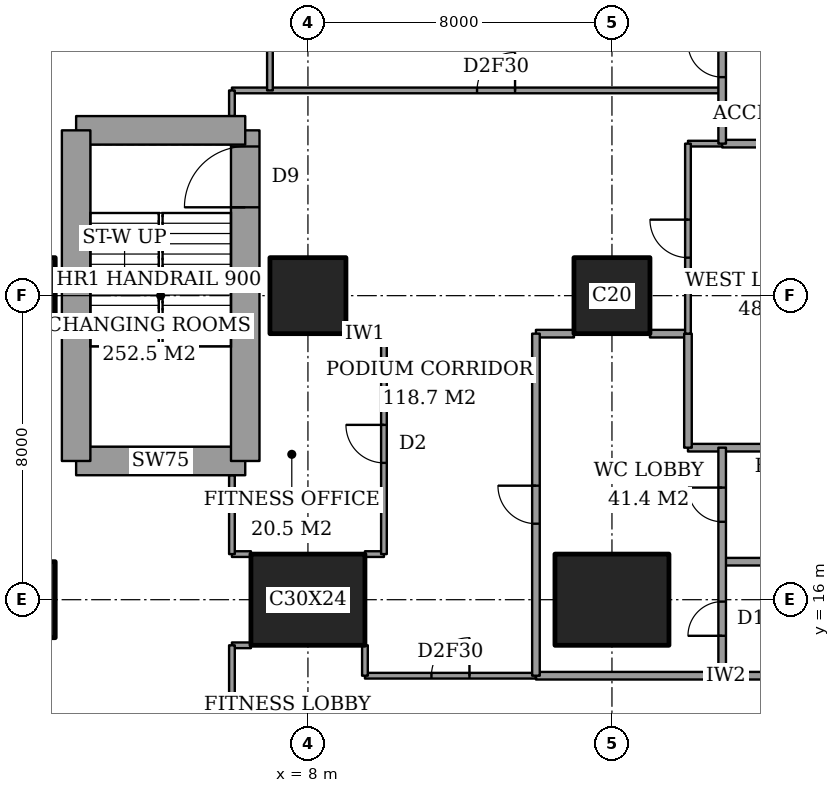
"""IFC4 building model, lengths in metres.
Left out: names, types, materials, properties, quantities, classifications, styles, units other than length and angle.
Written with IfcOpenShell. Run it as: python <this file> out.ifc"""

import sys

from ifc_helpers import new_model, si_unit, direction, frame, frame_2d, origin, origin_2d, place, context, subcontext, project, spatial, rectangle, extrude, element, fill, save


model = new_model("IFC4")
c1 = context("Model", 3, precision=1e-05, world=origin(), true_north=direction((0.0, 1.0)))
c2 = subcontext(c1, "Body", "Model", "MODEL_VIEW")
j1 = project(units=[si_unit("LENGTHUNIT", "METRE"), si_unit("PLANEANGLEUNIT", "RADIAN")], contexts=[c1])
p1 = place(None, origin())
s1 = spatial("IfcSite", under=j1, at=p1, CompositionType="ELEMENT")
p2 = place(p1, origin())
s2 = spatial("IfcBuilding", under=s1, at=p2, CompositionType="ELEMENT")
p3 = place(p2, frame((0.0, 0.0, 11.0)))
s3 = spatial("IfcBuildingStorey", under=s2, at=p3, CompositionType="ELEMENT", Elevation=11.0)
for number, where, z_axis, x_axis in (
    (1, (0.35, 16.0, 0.0), (0.0, 0.0, 1.0), (1.0, 0.0, 0.0)),
    (2, (0.35, 24.0, 0.0), (0.0, 0.0, 1.0), (1.0, 0.0, 0.0)),
):
    element("IfcColumn", number, at=place(p3, frame(where, z_axis=z_axis, x_axis=x_axis)), inside=s3, PredefinedType="COLUMN", context=c2, shape_type="SweptSolid", body=[
        extrude(rectangle(XDim=2.0, YDim=2.0, at=origin_2d()), origin(), (0.0, 0.0, 1.0), 5.0),
    ])
p4 = place(p3, frame((8.0, 16.0, 0.0), z_axis=(0.0, 0.0, 1.0), x_axis=(1.0, 0.0, 0.0)))
e3 = element("IfcColumn", 3, at=p4, inside=s3, PredefinedType="COLUMN", context=c2, shape_type="SweptSolid", body=[
    extrude(rectangle(XDim=3.0, YDim=2.4, at=origin_2d()), origin(), (0.0, 0.0, 1.0), 5.0),
])
p5 = place(p3, frame((8.0, 24.0, 0.0), z_axis=(0.0, 0.0, 1.0), x_axis=(1.0, 0.0, 0.0)))
e4 = element("IfcColumn", 4, at=p5, inside=s3, PredefinedType="COLUMN", context=c2, shape_type="SweptSolid", body=[
    extrude(rectangle(XDim=2.0, YDim=2.0, at=origin_2d()), origin(), (0.0, 0.0, 1.0), 5.0),
])
p6 = place(p3, frame((16.0, 16.0, 0.0), z_axis=(0.0, 0.0, 1.0), x_axis=(1.0, 0.0, 0.0)))
e5 = element("IfcColumn", 5, at=p6, inside=s3, PredefinedType="COLUMN", context=c2, shape_type="SweptSolid", body=[
    extrude(rectangle(XDim=3.0, YDim=2.4, at=origin_2d()), origin(), (0.0, 0.0, 1.0), 5.0),
])
p7 = place(p3, frame((16.0, 24.0, 0.0), z_axis=(0.0, 0.0, 1.0), x_axis=(1.0, 0.0, 0.0)))
e6 = element("IfcColumn", 6, at=p7, inside=s3, PredefinedType="COLUMN", context=c2, shape_type="SweptSolid", body=[
    extrude(rectangle(XDim=2.0, YDim=2.0, at=origin_2d()), origin(), (0.0, 0.0, 1.0), 5.0),
])
p8 = place(p3, frame((1.9, 19.65, 0.0), z_axis=(0.0, 0.0, 1.0), x_axis=(1.0, 0.0, 0.0)))
e7 = element("IfcWall", 7, at=p8, inside=s3, PredefinedType="SHEAR", context=c2, shape_type="SweptSolid", body=[
    extrude(rectangle(XDim=4.45, YDim=0.75, at=frame_2d((2.225, 0.0))), origin(), (0.0, 0.0, 1.0), 5.0),
])
p9 = place(p3, frame((6.35, 19.65, 0.0), z_axis=(0.0, 0.0, 1.0), x_axis=(0.0, 1.0, 0.0)))
e8 = element("IfcWall", 8, at=p9, inside=s3, PredefinedType="SHEAR", context=c2, shape_type="SweptSolid", body=[
    extrude(rectangle(XDim=8.7, YDim=0.75, at=frame_2d((4.35, 0.0))), origin(), (0.0, 0.0, 1.0), 5.0),
])
p10 = place(p9, frame((6.675, 0.0, 0.0)))
e9 = element("IfcOpeningElement", 9, at=p10, cuts=e8, PredefinedType="OPENING", context=c2, shape_type="SweptSolid", body=[
    extrude(rectangle(XDim=1.6, YDim=2.1, at=frame_2d((0.8, 1.05))), frame((0.0, 0.385, 0.0), z_axis=(0.0, -1.0, 0.0), x_axis=(1.0, 0.0, 0.0)), (0.0, 0.0, 1.0), 0.77),
])
p11 = place(p3, frame((6.35, 28.35, 0.0), z_axis=(0.0, 0.0, 1.0), x_axis=(-1.0, 0.0, 0.0)))
e10 = element("IfcWall", 10, at=p11, inside=s3, PredefinedType="SHEAR", context=c2, shape_type="SweptSolid", body=[
    extrude(rectangle(XDim=4.45, YDim=0.75, at=frame_2d((2.225, 0.0))), origin(), (0.0, 0.0, 1.0), 5.0),
])
p12 = place(p3, frame((1.9, 28.35, 0.0), z_axis=(0.0, 0.0, 1.0), x_axis=(0.0, -1.0, 0.0)))
e11 = element("IfcWall", 11, at=p12, inside=s3, PredefinedType="SHEAR", context=c2, shape_type="SweptSolid", body=[
    extrude(rectangle(XDim=8.7, YDim=0.75, at=frame_2d((4.35, 0.0))), origin(), (0.0, 0.0, 1.0), 5.0),
])
p13 = place(p3, frame((14.0, 14.0, 0.0), z_axis=(0.0, 0.0, 1.0), x_axis=(1.0, 0.0, 0.0)))
e12 = element("IfcWall", 12, at=p13, inside=s3, PredefinedType="PARTITIONING", context=c2, shape_type="SweptSolid", body=[
    extrude(rectangle(XDim=10.0, YDim=0.2, at=frame_2d((5.0, 0.0))), origin(), (0.0, 0.0, 1.0), 4.7),
])
p14 = place(p3, frame((9.5, 14.0, 0.0), z_axis=(0.0, 0.0, 1.0), x_axis=(1.0, 0.0, 0.0)))
e13 = element("IfcWall", 13, at=p14, inside=s3, PredefinedType="PARTITIONING", context=c2, shape_type="SweptSolid", body=[
    extrude(rectangle(XDim=4.5, YDim=0.15, at=frame_2d((2.25, 0.0))), origin(), (0.0, 0.0, 1.0), 4.7),
])
p15 = place(p14, frame((1.75, 0.0, 0.0)))
e14 = element("IfcOpeningElement", 14, at=p15, cuts=e13, PredefinedType="OPENING", context=c2, shape_type="SweptSolid", body=[
    extrude(rectangle(XDim=1.0, YDim=2.1, at=frame_2d((0.5, 1.05))), frame((0.0, 0.085, 0.0), z_axis=(0.0, -1.0, 0.0), x_axis=(1.0, 0.0, 0.0)), (0.0, 0.0, 1.0), 0.17),
])
p16 = place(p3, frame((6.0, 14.8, 0.0), z_axis=(0.0, 0.0, 1.0), x_axis=(1.0, 0.0, 0.0)))
e15 = element("IfcWall", 15, at=p16, inside=s3, PredefinedType="PARTITIONING", context=c2, shape_type="SweptSolid", body=[
    extrude(rectangle(XDim=0.5, YDim=0.15, at=frame_2d((0.25, 0.0))), origin(), (0.0, 0.0, 1.0), 4.7),
])
p17 = place(p3, frame((18.9, 17.0, 0.0), z_axis=(0.0, 0.0, 1.0), x_axis=(1.0, 0.0, 0.0)))
e16 = element("IfcWall", 16, at=p17, inside=s3, PredefinedType="PARTITIONING", context=c2, shape_type="SweptSolid", body=[
    extrude(rectangle(XDim=5.1, YDim=0.2, at=frame_2d((2.55, 0.0))), origin(), (0.0, 0.0, 1.0), 4.7),
])
for number, where, z_axis, x_axis in (
    (17, (6.0, 17.2, 0.0), (0.0, 0.0, 1.0), (1.0, 0.0, 0.0)),
    (18, (9.5, 17.2, 0.0), (0.0, 0.0, 1.0), (1.0, 0.0, 0.0)),
):
    element("IfcWall", number, at=place(p3, frame(where, z_axis=z_axis, x_axis=x_axis)), inside=s3, PredefinedType="PARTITIONING", context=c2, shape_type="SweptSolid", body=[
        extrude(rectangle(XDim=0.5, YDim=0.15, at=frame_2d((0.25, 0.0))), origin(), (0.0, 0.0, 1.0), 4.7),
    ])
p18 = place(p3, frame((18.0, 20.0, 0.0), z_axis=(0.0, 0.0, 1.0), x_axis=(1.0, 0.0, 0.0)))
e19 = element("IfcWall", 19, at=p18, inside=s3, PredefinedType="PARTITIONING", context=c2, shape_type="SweptSolid", body=[
    extrude(rectangle(XDim=6.0, YDim=0.2, at=frame_2d((3.0, 0.0))), origin(), (0.0, 0.0, 1.0), 4.7),
])
for number, where, z_axis, x_axis in (
    (20, (14.0, 23.0, 0.0), (0.0, 0.0, 1.0), (1.0, 0.0, 0.0)),
    (21, (17.0, 23.0, 0.0), (0.0, 0.0, 1.0), (1.0, 0.0, 0.0)),
):
    element("IfcWall", number, at=place(p3, frame(where, z_axis=z_axis, x_axis=x_axis)), inside=s3, PredefinedType="PARTITIONING", context=c2, shape_type="SweptSolid", body=[
        extrude(rectangle(XDim=1.0, YDim=0.2, at=frame_2d((0.5, 0.0))), origin(), (0.0, 0.0, 1.0), 4.7),
    ])
p19 = place(p3, frame((9.0, 23.0, 0.0), z_axis=(0.0, 0.0, 1.0), x_axis=(1.0, 0.0, 0.0)))
e22 = element("IfcWall", 22, at=p19, inside=s3, PredefinedType="PARTITIONING", context=c2, shape_type="SweptSolid", body=[
    extrude(rectangle(XDim=1.0, YDim=0.15, at=frame_2d((0.5, 0.0))), origin(), (0.0, 0.0, 1.0), 4.7),
])
p20 = place(p3, frame((18.9, 28.0, 0.0), z_axis=(0.0, 0.0, 1.0), x_axis=(1.0, 0.0, 0.0)))
e23 = element("IfcWall", 23, at=p20, inside=s3, PredefinedType="PARTITIONING", context=c2, shape_type="SweptSolid", body=[
    extrude(rectangle(XDim=5.1, YDim=0.2, at=frame_2d((2.55, 0.0))), origin(), (0.0, 0.0, 1.0), 4.7),
])
p21 = place(p3, frame((18.0, 28.0, 0.0), z_axis=(0.0, 0.0, 1.0), x_axis=(1.0, 0.0, 0.0)))
e24 = element("IfcWall", 24, at=p21, inside=s3, PredefinedType="PARTITIONING", context=c2, shape_type="SweptSolid", body=[
    extrude(rectangle(XDim=0.9, YDim=0.15, at=frame_2d((0.45, 0.0))), origin(), (0.0, 0.0, 1.0), 4.7),
])
p22 = place(p3, frame((6.0, 29.4, 0.0), z_axis=(0.0, 0.0, 1.0), x_axis=(1.0, 0.0, 0.0)))
e25 = element("IfcWall", 25, at=p22, inside=s3, PredefinedType="PARTITIONING", context=c2, shape_type="SweptSolid", body=[
    extrude(rectangle(XDim=12.9, YDim=0.15, at=frame_2d((6.45, 0.0))), origin(), (0.0, 0.0, 1.0), 4.7),
])
p23 = place(p22, frame((6.45, 0.0, 0.0)))
e26 = element("IfcOpeningElement", 26, at=p23, cuts=e25, PredefinedType="OPENING", context=c2, shape_type="SweptSolid", body=[
    extrude(rectangle(XDim=1.0, YDim=2.1, at=frame_2d((0.5, 1.05))), frame((0.0, 0.085, 0.0), z_axis=(0.0, -1.0, 0.0), x_axis=(1.0, 0.0, 0.0)), (0.0, 0.0, 1.0), 0.17),
])
p24 = place(p3, frame((6.0, 12.0, 0.0), z_axis=(0.0, 0.0, 1.0), x_axis=(0.0, 1.0, 0.0)))
e27 = element("IfcWall", 27, at=p24, inside=s3, PredefinedType="PARTITIONING", context=c2, shape_type="SweptSolid", body=[
    extrude(rectangle(XDim=2.8, YDim=0.15, at=frame_2d((1.4, 0.0))), origin(), (0.0, 0.0, 1.0), 4.7),
])
p25 = place(p3, frame((6.0, 17.2, 0.0), z_axis=(0.0, 0.0, 1.0), x_axis=(0.0, 1.0, 0.0)))
e28 = element("IfcWall", 28, at=p25, inside=s3, PredefinedType="PARTITIONING", context=c2, shape_type="SweptSolid", body=[
    extrude(rectangle(XDim=2.075, YDim=0.15, at=frame_2d((1.038, 0.0))), origin(), (0.0, 0.0, 1.0), 4.7),
])
p26 = place(p3, frame((6.0, 28.725, 0.0), z_axis=(0.0, 0.0, 1.0), x_axis=(0.0, 1.0, 0.0)))
e29 = element("IfcWall", 29, at=p26, inside=s3, PredefinedType="PARTITIONING", context=c2, shape_type="SweptSolid", body=[
    extrude(rectangle(XDim=0.675, YDim=0.15, at=frame_2d((0.337, 0.0))), origin(), (0.0, 0.0, 1.0), 4.7),
])
p27 = place(p3, frame((7.0, 29.4, 0.0), z_axis=(0.0, 0.0, 1.0), x_axis=(0.0, 1.0, 0.0)))
e30 = element("IfcWall", 30, at=p27, inside=s3, PredefinedType="PARTITIONING", context=c2, shape_type="SweptSolid", body=[
    extrude(rectangle(XDim=1.4, YDim=0.15, at=frame_2d((0.7, 0.0))), origin(), (0.0, 0.0, 1.0), 4.7),
])
p28 = place(p3, frame((9.5, 14.0, 0.0), z_axis=(0.0, 0.0, 1.0), x_axis=(0.0, 1.0, 0.0)))
e31 = element("IfcWall", 31, at=p28, inside=s3, PredefinedType="PARTITIONING", context=c2, shape_type="SweptSolid", body=[
    extrude(rectangle(XDim=0.8, YDim=0.15, at=frame_2d((0.4, 0.0))), origin(), (0.0, 0.0, 1.0), 4.7),
])
p29 = place(p3, frame((10.0, 17.2, 0.0), z_axis=(0.0, 0.0, 1.0), x_axis=(0.0, 1.0, 0.0)))
e32 = element("IfcWall", 32, at=p29, inside=s3, PredefinedType="PARTITIONING", context=c2, shape_type="SweptSolid", body=[
    extrude(rectangle(XDim=5.8, YDim=0.15, at=frame_2d((2.9, 0.0))), origin(), (0.0, 0.0, 1.0), 4.7),
])
p30 = place(p29, frame((2.4, 0.0, 0.0)))
e33 = element("IfcOpeningElement", 33, at=p30, cuts=e32, PredefinedType="OPENING", context=c2, shape_type="SweptSolid", body=[
    extrude(rectangle(XDim=1.0, YDim=2.1, at=frame_2d((0.5, 1.05))), frame((0.0, 0.085, 0.0), z_axis=(0.0, -1.0, 0.0), x_axis=(1.0, 0.0, 0.0)), (0.0, 0.0, 1.0), 0.17),
])
p31 = place(p3, frame((14.0, 14.0, 0.0), z_axis=(0.0, 0.0, 1.0), x_axis=(0.0, 1.0, 0.0)))
e34 = element("IfcWall", 34, at=p31, inside=s3, PredefinedType="PARTITIONING", context=c2, shape_type="SweptSolid", body=[
    extrude(rectangle(XDim=9.0, YDim=0.2, at=frame_2d((4.5, 0.0))), origin(), (0.0, 0.0, 1.0), 4.7),
])
p32 = place(p31, frame((4.0, 0.0, 0.0)))
e35 = element("IfcOpeningElement", 35, at=p32, cuts=e34, PredefinedType="OPENING", context=c2, shape_type="SweptSolid", body=[
    extrude(rectangle(XDim=1.0, YDim=2.1, at=frame_2d((0.5, 1.05))), frame((0.0, 0.11, 0.0), z_axis=(0.0, -1.0, 0.0), x_axis=(1.0, 0.0, 0.0)), (0.0, 0.0, 1.0), 0.22),
])
p33 = place(p3, frame((18.0, 20.0, 0.0), z_axis=(0.0, 0.0, 1.0), x_axis=(0.0, 1.0, 0.0)))
e36 = element("IfcWall", 36, at=p33, inside=s3, PredefinedType="PARTITIONING", context=c2, shape_type="SweptSolid", body=[
    extrude(rectangle(XDim=3.0, YDim=0.2, at=frame_2d((1.5, 0.0))), origin(), (0.0, 0.0, 1.0), 4.7),
])
p34 = place(p3, frame((18.0, 23.0, 0.0), z_axis=(0.0, 0.0, 1.0), x_axis=(0.0, 1.0, 0.0)))
e37 = element("IfcWall", 37, at=p34, inside=s3, PredefinedType="PARTITIONING", context=c2, shape_type="SweptSolid", body=[
    extrude(rectangle(XDim=5.0, YDim=0.15, at=frame_2d((2.5, 0.0))), origin(), (0.0, 0.0, 1.0), 4.7),
])
p35 = place(p34, frame((2.0, 0.0, 0.0)))
e38 = element("IfcOpeningElement", 38, at=p35, cuts=e37, PredefinedType="OPENING", context=c2, shape_type="SweptSolid", body=[
    extrude(rectangle(XDim=1.0, YDim=2.1, at=frame_2d((0.5, 1.05))), frame((0.0, 0.085, 0.0), z_axis=(0.0, -1.0, 0.0), x_axis=(1.0, 0.0, 0.0)), (0.0, 0.0, 1.0), 0.17),
])
p36 = place(p3, frame((18.9, 14.0, 0.0), z_axis=(0.0, 0.0, 1.0), x_axis=(0.0, 1.0, 0.0)))
e39 = element("IfcWall", 39, at=p36, inside=s3, PredefinedType="PARTITIONING", context=c2, shape_type="SweptSolid", body=[
    extrude(rectangle(XDim=6.0, YDim=0.2, at=frame_2d((3.0, 0.0))), origin(), (0.0, 0.0, 1.0), 4.7),
])
p37 = place(p36, frame((1.05, 0.0, 0.0)))
e40 = element("IfcOpeningElement", 40, at=p37, cuts=e39, PredefinedType="OPENING", context=c2, shape_type="SweptSolid", body=[
    extrude(rectangle(XDim=0.9, YDim=2.1, at=frame_2d((0.45, 1.05))), frame((0.0, 0.11, 0.0), z_axis=(0.0, -1.0, 0.0), x_axis=(1.0, 0.0, 0.0)), (0.0, 0.0, 1.0), 0.22),
])
p38 = place(p36, frame((4.05, 0.0, 0.0)))
e41 = element("IfcOpeningElement", 41, at=p38, cuts=e39, PredefinedType="OPENING", context=c2, shape_type="SweptSolid", body=[
    extrude(rectangle(XDim=0.9, YDim=2.1, at=frame_2d((0.45, 1.05))), frame((0.0, 0.11, 0.0), z_axis=(0.0, -1.0, 0.0), x_axis=(1.0, 0.0, 0.0)), (0.0, 0.0, 1.0), 0.22),
])
p39 = place(p3, frame((18.9, 28.0, 0.0), z_axis=(0.0, 0.0, 1.0), x_axis=(0.0, 1.0, 0.0)))
e42 = element("IfcWall", 42, at=p39, inside=s3, PredefinedType="PARTITIONING", context=c2, shape_type="SweptSolid", body=[
    extrude(rectangle(XDim=3.0, YDim=0.2, at=frame_2d((1.5, 0.0))), origin(), (0.0, 0.0, 1.0), 4.7),
])
p40 = place(p39, frame((1.75, 0.0, 0.0)))
e43 = element("IfcOpeningElement", 43, at=p40, cuts=e42, PredefinedType="OPENING", context=c2, shape_type="SweptSolid", body=[
    extrude(rectangle(XDim=0.9, YDim=2.1, at=frame_2d((0.45, 1.05))), frame((0.0, 0.11, 0.0), z_axis=(0.0, -1.0, 0.0), x_axis=(1.0, 0.0, 0.0)), (0.0, 0.0, 1.0), 0.22),
])
p41 = place(p15, origin())
e44 = element("IfcDoor", 44, at=p41, inside=s3, OperationType="SINGLE_SWING_LEFT", PredefinedType="DOOR", context=c2, shape_type="SweptSolid", body=[
    extrude(rectangle(XDim=1.0, YDim=2.1, at=frame_2d((0.5, 1.05))), frame((0.0, 0.025, 0.0), z_axis=(0.0, -1.0, 0.0), x_axis=(1.0, 0.0, 0.0)), (0.0, 0.0, 1.0), 0.05),
])
fill(e14, e44)
p42 = place(p30, origin())
e45 = element("IfcDoor", 45, at=p42, inside=s3, OperationType="SINGLE_SWING_LEFT", PredefinedType="DOOR", context=c2, shape_type="SweptSolid", body=[
    extrude(rectangle(XDim=1.0, YDim=2.1, at=frame_2d((0.5, 1.05))), frame((0.0, 0.025, 0.0), z_axis=(0.0, -1.0, 0.0), x_axis=(1.0, 0.0, 0.0)), (0.0, 0.0, 1.0), 0.05),
])
fill(e33, e45)
p43 = place(p32, origin())
e46 = element("IfcDoor", 46, at=p43, inside=s3, OperationType="SINGLE_SWING_LEFT", PredefinedType="DOOR", context=c2, shape_type="SweptSolid", body=[
    extrude(rectangle(XDim=1.0, YDim=2.1, at=frame_2d((0.5, 1.05))), frame((0.0, 0.025, 0.0), z_axis=(0.0, -1.0, 0.0), x_axis=(1.0, 0.0, 0.0)), (0.0, 0.0, 1.0), 0.05),
])
fill(e35, e46)
p44 = place(p35, origin())
e47 = element("IfcDoor", 47, at=p44, inside=s3, OperationType="SINGLE_SWING_LEFT", PredefinedType="DOOR", context=c2, shape_type="SweptSolid", body=[
    extrude(rectangle(XDim=1.0, YDim=2.1, at=frame_2d((0.5, 1.05))), frame((0.0, 0.025, 0.0), z_axis=(0.0, -1.0, 0.0), x_axis=(1.0, 0.0, 0.0)), (0.0, 0.0, 1.0), 0.05),
])
fill(e38, e47)
p45 = place(p37, origin())
e48 = element("IfcDoor", 48, at=p45, inside=s3, OperationType="SINGLE_SWING_RIGHT", PredefinedType="DOOR", context=c2, shape_type="SweptSolid", body=[
    extrude(rectangle(XDim=0.9, YDim=2.1, at=frame_2d((0.45, 1.05))), frame((0.0, 0.025, 0.0), z_axis=(0.0, -1.0, 0.0), x_axis=(1.0, 0.0, 0.0)), (0.0, 0.0, 1.0), 0.05),
])
fill(e40, e48)
p46 = place(p38, origin())
e49 = element("IfcDoor", 49, at=p46, inside=s3, OperationType="SINGLE_SWING_LEFT", PredefinedType="DOOR", context=c2, shape_type="SweptSolid", body=[
    extrude(rectangle(XDim=0.9, YDim=2.1, at=frame_2d((0.45, 1.05))), frame((0.0, 0.025, 0.0), z_axis=(0.0, -1.0, 0.0), x_axis=(1.0, 0.0, 0.0)), (0.0, 0.0, 1.0), 0.05),
])
fill(e41, e49)
p47 = place(p40, origin())
e50 = element("IfcDoor", 50, at=p47, inside=s3, OperationType="SINGLE_SWING_LEFT", PredefinedType="DOOR", context=c2, shape_type="SweptSolid", body=[
    extrude(rectangle(XDim=0.9, YDim=2.1, at=frame_2d((0.45, 1.05))), frame((0.0, 0.025, 0.0), z_axis=(0.0, -1.0, 0.0), x_axis=(1.0, 0.0, 0.0)), (0.0, 0.0, 1.0), 0.05),
])
fill(e43, e50)
p48 = place(p23, origin())
e51 = element("IfcDoor", 51, at=p48, inside=s3, OperationType="SINGLE_SWING_LEFT", PredefinedType="DOOR", context=c2, shape_type="SweptSolid", body=[
    extrude(rectangle(XDim=1.0, YDim=2.1, at=frame_2d((0.5, 1.05))), frame((0.0, 0.025, 0.0), z_axis=(0.0, -1.0, 0.0), x_axis=(1.0, 0.0, 0.0)), (0.0, 0.0, 1.0), 0.05),
])
fill(e26, e51)
p49 = place(p10, origin())
e52 = element("IfcDoor", 52, at=p49, inside=s3, OperationType="DOUBLE_DOOR_SINGLE_SWING", PredefinedType="DOOR", context=c2, shape_type="SweptSolid", body=[
    extrude(rectangle(XDim=1.6, YDim=2.1, at=frame_2d((0.8, 1.05))), frame((0.0, 0.025, 0.0), z_axis=(0.0, -1.0, 0.0), x_axis=(1.0, 0.0, 0.0)), (0.0, 0.0, 1.0), 0.05),
])
fill(e9, e52)
save(model, sys.argv[1])
